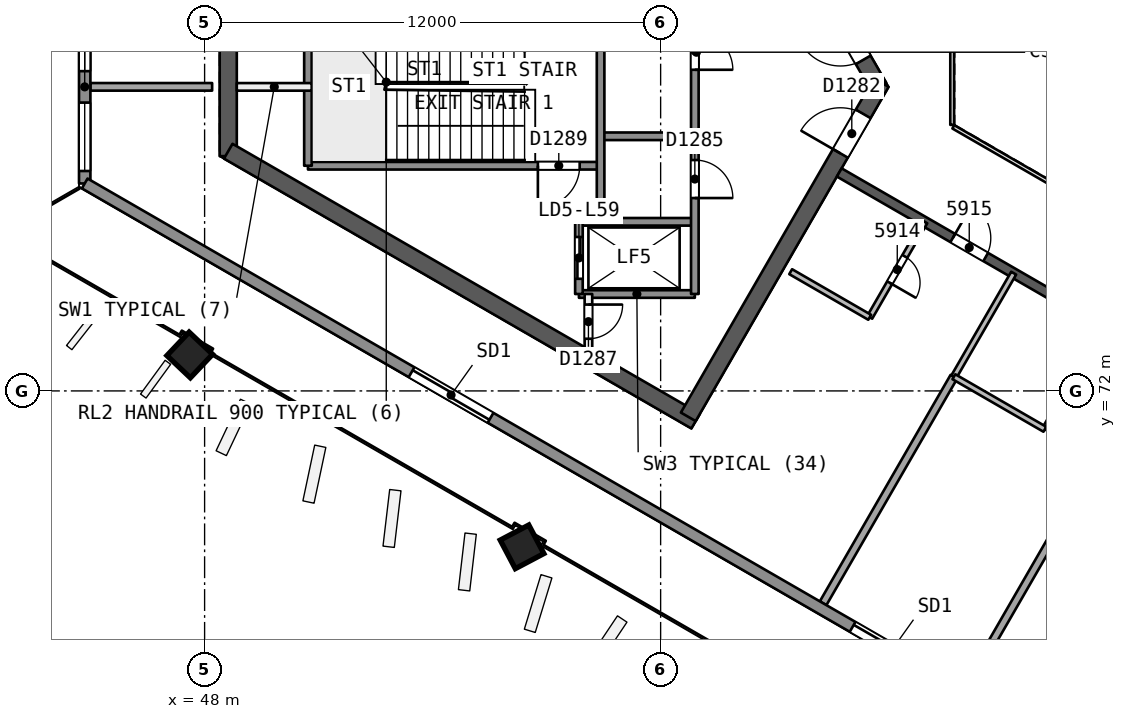
"""IFC4 building model, lengths in metres.
Left out: names, types, materials, properties, quantities, classifications, styles, units other than length and angle.
Written with IfcOpenShell. Run it as: python <this file> out.ifc"""

import sys

from ifc_helpers import new_model, si_unit, direction, frame, frame_2d, origin, origin_2d, place, context, subcontext, project, spatial, rectangle, extrude, element, fill, save


model = new_model("IFC4")
c1 = context("Model", 3, precision=1e-05, world=origin(), true_north=direction((0.0, 1.0)))
c2 = subcontext(c1, "Body", "Model", "MODEL_VIEW")
j1 = project(units=[si_unit("LENGTHUNIT", "METRE"), si_unit("PLANEANGLEUNIT", "RADIAN")], contexts=[c1])
p1 = place(None, origin())
s1 = spatial("IfcSite", under=j1, at=p1, CompositionType="ELEMENT")
p2 = place(p1, origin())
s2 = spatial("IfcBuilding", under=s1, at=p2, CompositionType="ELEMENT")
p3 = place(p2, frame((0.0, 0.0, 239.1)))
s3 = spatial("IfcBuildingStorey", under=s2, at=p3, CompositionType="ELEMENT", Elevation=239.1)
p4 = place(p3, frame((65.74, 80.0, 0.0), z_axis=(0.0, 0.0, 1.0), x_axis=(-0.499991857942, 0.866030104553, 0.0)))
e1 = element("IfcWall", 1, at=p4, inside=s3, PredefinedType="SHEAR", context=c2, shape_type="SweptSolid", body=[
    extrude(rectangle(XDim=10.25, YDim=0.45, at=frame_2d((5.125, 0.0))), origin(), (0.0, 0.0, 1.0), 3.7),
])
p5 = place(p4, frame((0.82, 0.0, 0.0)))
e2 = element("IfcOpeningElement", 2, at=p5, cuts=e1, PredefinedType="OPENING", context=c2, shape_type="SweptSolid", body=[
    extrude(rectangle(XDim=1.2, YDim=2.1, at=frame_2d((0.6, 1.05))), frame((0.0, 0.235, 0.0), z_axis=(0.0, -1.0, 0.0), x_axis=(1.0, 0.0, 0.0)), (0.0, 0.0, 1.0), 0.471),
])
p6 = place(p3, frame((48.622, 81.693, 0.0), z_axis=(0.0, 0.0, 1.0), x_axis=(0.0, -1.0, 0.0)))
e3 = element("IfcWall", 3, at=p6, inside=s3, PredefinedType="SHEAR", context=c2, shape_type="SweptSolid", body=[
    extrude(rectangle(XDim=3.515, YDim=0.45, at=frame_2d((1.758, 0.0))), origin(), (0.0, 0.0, 1.0), 3.7),
])
p7 = place(p3, frame((48.622, 78.307, 0.0), z_axis=(0.0, 0.0, 1.0), x_axis=(0.86602701116, -0.499997215934, 0.0)))
e4 = element("IfcWall", 4, at=p7, inside=s3, PredefinedType="SHEAR", context=c2, shape_type="SweptSolid", body=[
    extrude(rectangle(XDim=14.204, YDim=0.45, at=frame_2d((7.102, 0.0))), origin(), (0.0, 0.0, 1.0), 3.7),
])
p8 = place(p3, frame((60.728, 71.318, 0.0), z_axis=(0.0, 0.0, 1.0), x_axis=(0.500012416173, 0.866018235185, 0.0)))
e5 = element("IfcWall", 5, at=p8, inside=s3, PredefinedType="SHEAR", context=c2, shape_type="SweptSolid", body=[
    extrude(rectangle(XDim=10.155, YDim=0.45, at=frame_2d((5.078, 0.0))), origin(), (0.0, 0.0, 1.0), 3.7),
])
p9 = place(p8, frame((8.005, 0.0, 0.0)))
e6 = element("IfcOpeningElement", 6, at=p9, cuts=e5, PredefinedType="OPENING", context=c2, shape_type="SweptSolid", body=[
    extrude(rectangle(XDim=1.2, YDim=2.1, at=frame_2d((0.6, 1.05))), frame((0.0, 0.235, 0.0), z_axis=(0.0, -1.0, 0.0), x_axis=(1.0, 0.0, 0.0)), (0.0, 0.0, 1.0), 0.471),
])
p10 = place(p3, frame((64.7, 77.748, 0.0), z_axis=(0.0, 0.0, 1.0), x_axis=(0.866026492143, -0.499998114903, 0.0)))
e7 = element("IfcWall", 7, at=p10, inside=s3, PredefinedType="SHEAR", context=c2, shape_type="SweptSolid", body=[
    extrude(rectangle(XDim=15.588, YDim=0.25, at=frame_2d((7.794, 0.0))), origin(), (0.0, 0.0, 1.0), 3.3),
])
p11 = place(p10, frame((3.45, 0.0, 0.0)))
e8 = element("IfcOpeningElement", 8, at=p11, cuts=e7, PredefinedType="OPENING", context=c2, shape_type="SweptSolid", body=[
    extrude(rectangle(XDim=1.0, YDim=2.1, at=frame_2d((0.5, 1.05))), frame((0.0, 0.135, 0.0), z_axis=(0.0, -1.0, 0.0), x_axis=(1.0, 0.0, 0.0)), (0.0, 0.0, 1.0), 0.271),
])
p12 = place(p10, frame((8.315, 0.0, 0.0)))
e9 = element("IfcOpeningElement", 9, at=p12, cuts=e7, PredefinedType="OPENING", context=c2, shape_type="SweptSolid", body=[
    extrude(rectangle(XDim=1.1, YDim=2.1, at=frame_2d((0.55, 1.05))), frame((0.0, 0.135, 0.0), z_axis=(0.0, -1.0, 0.0), x_axis=(1.0, 0.0, 0.0)), (0.0, 0.0, 1.0), 0.271),
])
p13 = place(p10, frame((10.827, 0.0, 0.0)))
e10 = element("IfcOpeningElement", 10, at=p13, cuts=e7, PredefinedType="OPENING", context=c2, shape_type="SweptSolid", body=[
    extrude(rectangle(XDim=1.0, YDim=2.1, at=frame_2d((0.5, 1.05))), frame((0.0, 0.135, 0.0), z_axis=(0.0, -1.0, 0.0), x_axis=(1.0, 0.0, 0.0)), (0.0, 0.0, 1.0), 0.271),
])
p14 = place(p3, frame((47.575, 72.938, 0.0), z_axis=(0.028559101991, 0.006859460986, 0.999568569678), x_axis=(-0.866411455062, 0.498874907895, 0.021331123037)))
e11 = element("IfcColumn", 11, at=p14, inside=s3, PredefinedType="COLUMN", context=c2, shape_type="SweptSolid", body=[
    extrude(rectangle(XDim=0.85, YDim=0.85, at=origin_2d()), origin(), (0.0, 0.0, 1.0), 3.702),
])
p15 = place(p3, frame((56.33, 67.883, 0.0), z_axis=(0.019328516974, 0.012138044789, 0.999739504221), x_axis=(-0.865694061334, 0.500459928951, 0.010660754407)))
e12 = element("IfcColumn", 12, at=p15, inside=s3, PredefinedType="COLUMN", context=c2, shape_type="SweptSolid", body=[
    extrude(rectangle(XDim=0.85, YDim=0.85, at=origin_2d()), origin(), (0.0, 0.0, 1.0), 3.701),
])
p16 = place(p3, frame((44.994, 80.001, 0.0), z_axis=(0.0, 0.0, 1.0), x_axis=(1.0, 0.0, 0.0)))
e13 = element("IfcWall", 13, at=p16, inside=s3, PredefinedType="PARTITIONING", context=c2, shape_type="SweptSolid", body=[
    extrude(rectangle(XDim=3.204, YDim=0.2, at=frame_2d((1.602, 0.0))), origin(), (0.0, 0.0, 1.0), 3.3),
])
p17 = place(p3, frame((66.952, 76.448, 0.0), z_axis=(0.0, 0.0, 1.0), x_axis=(-0.499987231761, -0.866032775405, 0.0)))
e14 = element("IfcWall", 14, at=p17, inside=s3, PredefinedType="PARTITIONING", context=c2, shape_type="SweptSolid", body=[
    extrude(rectangle(XDim=2.9, YDim=0.15, at=frame_2d((1.45, 0.0))), origin(), (0.0, 0.0, 1.0), 3.3),
])
p18 = place(p17, frame((1.05, 0.0, 0.0)))
e15 = element("IfcOpeningElement", 15, at=p18, cuts=e14, PredefinedType="OPENING", context=c2, shape_type="SweptSolid", body=[
    extrude(rectangle(XDim=0.8, YDim=2.1, at=frame_2d((0.4, 1.05))), frame((0.0, 0.085, 0.0), z_axis=(0.0, -1.0, 0.0), x_axis=(1.0, 0.0, 0.0)), (0.0, 0.0, 1.0), 0.171),
])
p19 = place(p3, frame((65.502, 73.937, 0.0), z_axis=(0.0, 0.0, 1.0), x_axis=(-0.865994240961, 0.500053971709, 0.0)))
e16 = element("IfcWall", 16, at=p19, inside=s3, PredefinedType="PARTITIONING", context=c2, shape_type="SweptSolid", body=[
    extrude(rectangle(XDim=2.401, YDim=0.15, at=frame_2d((1.201, 0.0))), origin(), (0.0, 0.0, 1.0), 3.3),
])
p20 = place(p3, frame((64.275, 66.413, 0.0), z_axis=(0.0, 0.0, 1.0), x_axis=(0.500015178307, 0.866016640408, 0.0)))
e17 = element("IfcWall", 17, at=p20, inside=s3, PredefinedType="PARTITIONING", context=c2, shape_type="SweptSolid", body=[
    extrude(rectangle(XDim=6.883, YDim=0.2, at=frame_2d((3.441, 0.0))), origin(), (0.0, 0.0, 1.0), 3.3),
])
p21 = place(p3, frame((67.717, 72.373, 0.0), z_axis=(0.0, 0.0, 1.0), x_axis=(0.500002266011, 0.866024095498, 0.0)))
e18 = element("IfcWall", 18, at=p21, inside=s3, PredefinedType="PARTITIONING", context=c2, shape_type="SweptSolid", body=[
    extrude(rectangle(XDim=3.147, YDim=0.15, at=frame_2d((1.573, 0.0))), origin(), (0.0, 0.0, 1.0), 3.3),
])
p22 = place(p3, frame((71.684, 73.716, 0.0), z_axis=(0.0, 0.0, 1.0), x_axis=(-0.499977671647, -0.866038294681, 0.0)))
e19 = element("IfcWall", 19, at=p22, inside=s3, PredefinedType="PARTITIONING", context=c2, shape_type="SweptSolid", body=[
    extrude(rectangle(XDim=3.147, YDim=0.15, at=frame_2d((1.573, 0.0))), origin(), (0.0, 0.0, 1.0), 3.3),
])
p23 = place(p22, frame((1.123, 0.0, 0.0)))
e20 = element("IfcOpeningElement", 20, at=p23, cuts=e19, PredefinedType="OPENING", context=c2, shape_type="SweptSolid", body=[
    extrude(rectangle(XDim=0.9, YDim=2.1, at=frame_2d((0.45, 1.05))), frame((0.0, 0.085, 0.0), z_axis=(0.0, -1.0, 0.0), x_axis=(1.0, 0.0, 0.0)), (0.0, 0.0, 1.0), 0.171),
])
p24 = place(p3, frame((70.111, 70.991, 0.0), z_axis=(0.0, 0.0, 1.0), x_axis=(-0.866050310653, 0.499956857557, 0.0)))
e21 = element("IfcWall", 21, at=p24, inside=s3, PredefinedType="PARTITIONING", context=c2, shape_type="SweptSolid", body=[
    extrude(rectangle(XDim=2.765, YDim=0.15, at=frame_2d((1.382, 0.0))), origin(), (0.0, 0.0, 1.0), 3.3),
])
p25 = place(p3, frame((68.055, 64.23, 0.0), z_axis=(0.0, 0.0, 1.0), x_axis=(0.50001112685, 0.866018979599, 0.0)))
e22 = element("IfcWall", 22, at=p25, inside=s3, PredefinedType="PARTITIONING", context=c2, shape_type="SweptSolid", body=[
    extrude(rectangle(XDim=10.03, YDim=0.2, at=frame_2d((5.015, 0.0))), origin(), (0.0, 0.0, 1.0), 3.3),
])
p26 = place(p3, frame((44.845, 77.458, 0.0), z_axis=(0.0, 0.0, 1.0), x_axis=(0.0, 1.0, 0.0)))
e23 = element("IfcWall", 23, at=p26, inside=s3, PredefinedType="SOLIDWALL", context=c2, shape_type="SweptSolid", body=[
    extrude(rectangle(XDim=5.083, YDim=0.3, at=frame_2d((2.542, 0.0))), origin(), (0.0, 0.0, 1.0), 3.3),
])
p27 = place(p26, frame((2.955, 0.0, 0.9)))
e24 = element("IfcOpeningElement", 24, at=p27, cuts=e23, PredefinedType="OPENING", context=c2, shape_type="SweptSolid", body=[
    extrude(rectangle(XDim=1.8, YDim=1.5, at=frame_2d((0.9, 0.75))), frame((0.0, 0.161, 0.0), z_axis=(0.0, -1.0, 0.0), x_axis=(1.0, 0.0, 0.0)), (0.0, 0.0, 1.0), 0.321),
])
p28 = place(p26, frame((0.328, 0.0, 0.9)))
e25 = element("IfcOpeningElement", 25, at=p28, cuts=e23, PredefinedType="OPENING", context=c2, shape_type="SweptSolid", body=[
    extrude(rectangle(XDim=1.8, YDim=1.5, at=frame_2d((0.9, 0.75))), frame((0.0, 0.161, 0.0), z_axis=(0.0, -1.0, 0.0), x_axis=(1.0, 0.0, 0.0)), (0.0, 0.0, 1.0), 0.321),
])
p29 = place(p3, frame((87.876, 52.614, 0.0), z_axis=(0.0, 0.0, 1.0), x_axis=(-0.866025459945, 0.499999902727, 0.0)))
e26 = element("IfcWall", 26, at=p29, inside=s3, PredefinedType="SOLIDWALL", context=c2, shape_type="SweptSolid", body=[
    extrude(rectangle(XDim=49.688, YDim=0.3, at=frame_2d((24.844, 0.0))), origin(), (0.0, 0.0, 1.0), 3.3),
])
p30 = place(p29, frame((23.956, 0.0, 0.0)))
e27 = element("IfcOpeningElement", 27, at=p30, cuts=e26, PredefinedType="OPENING", context=c2, shape_type="SweptSolid", body=[
    extrude(rectangle(XDim=2.4, YDim=2.4, at=frame_2d((1.2, 1.2))), frame((0.0, 0.161, 0.0), z_axis=(0.0, -1.0, 0.0), x_axis=(1.0, 0.0, 0.0)), (0.0, 0.0, 1.0), 0.321),
])
p31 = place(p29, frame((37.357, 0.0, 0.0)))
e28 = element("IfcOpeningElement", 28, at=p31, cuts=e26, PredefinedType="OPENING", context=c2, shape_type="SweptSolid", body=[
    extrude(rectangle(XDim=2.4, YDim=2.4, at=frame_2d((1.2, 1.2))), frame((0.0, 0.161, 0.0), z_axis=(0.0, -1.0, 0.0), x_axis=(1.0, 0.0, 0.0)), (0.0, 0.0, 1.0), 0.321),
])
p32 = place(p29, frame((10.243, 0.0, 0.0)))
e29 = element("IfcOpeningElement", 29, at=p32, cuts=e26, PredefinedType="OPENING", context=c2, shape_type="SweptSolid", body=[
    extrude(rectangle(XDim=2.4, YDim=2.4, at=frame_2d((1.2, 1.2))), frame((0.0, 0.161, 0.0), z_axis=(0.0, -1.0, 0.0), x_axis=(1.0, 0.0, 0.0)), (0.0, 0.0, 1.0), 0.321),
])
p33 = place(p3, frame((50.82, 80.0, 0.0), z_axis=(0.0, 0.0, 1.0), x_axis=(-1.0, 0.0, 0.0)))
e30 = element("IfcWall", 30, at=p33, inside=s3, PredefinedType="PARTITIONING", context=c2, shape_type="SweptSolid", body=[
    extrude(rectangle(XDim=1.973, YDim=0.2, at=frame_2d((0.987, 0.0))), origin(), (0.0, 0.0, 1.0), 3.3),
])
p34 = place(p3, frame((60.9, 78.7, 0.0), z_axis=(0.0, 0.0, 1.0), x_axis=(-1.0, 0.0, 0.0)))
e31 = element("IfcWall", 31, at=p34, inside=s3, PredefinedType="SOLIDWALL", context=c2, shape_type="SweptSolid", body=[
    extrude(rectangle(XDim=2.48, YDim=0.2, at=frame_2d((1.24, 0.0))), origin(), (0.0, 0.0, 1.0), 3.3),
])
p35 = place(p3, frame((58.42, 77.925, 0.0), z_axis=(0.0, 0.0, 1.0), x_axis=(-1.0, 0.0, 0.0)))
e32 = element("IfcWall", 32, at=p35, inside=s3, PredefinedType="SOLIDWALL", context=c2, shape_type="SweptSolid", body=[
    extrude(rectangle(XDim=7.7, YDim=0.2, at=frame_2d((3.85, 0.0))), origin(), (0.0, 0.0, 1.0), 3.3),
])
p36 = place(p35, frame((0.55, 0.0, 0.0)))
e33 = element("IfcOpeningElement", 33, at=p36, cuts=e32, PredefinedType="OPENING", context=c2, shape_type="SweptSolid", body=[
    extrude(rectangle(XDim=1.1, YDim=2.1, at=frame_2d((0.55, 1.05))), frame((0.0, 0.11, 0.0), z_axis=(0.0, -1.0, 0.0), x_axis=(1.0, 0.0, 0.0)), (0.0, 0.0, 1.0), 0.221),
])
for number, where, z_axis, x_axis in (
    (34, (60.9, 76.45, 0.0), (0.0, 0.0, 1.0), (-1.0, 0.0, 0.0)),
    (35, (60.9, 74.55, 0.0), (0.0, 0.0, 1.0), (-1.0, 0.0, 0.0)),
):
    element("IfcWall", number, at=place(p3, frame(where, z_axis=z_axis, x_axis=x_axis)), inside=s3, PredefinedType="SOLIDWALL", context=c2, shape_type="SweptSolid", body=[
        extrude(rectangle(XDim=3.05, YDim=0.2, at=frame_2d((1.525, 0.0))), origin(), (0.0, 0.0, 1.0), 3.3),
    ])
p37 = place(p3, frame((60.9, 85.45, 0.0), z_axis=(0.0, 0.0, 1.0), x_axis=(0.0, -1.0, 0.0)))
e36 = element("IfcWall", 36, at=p37, inside=s3, PredefinedType="SOLIDWALL", context=c2, shape_type="SweptSolid", body=[
    extrude(rectangle(XDim=10.9, YDim=0.2, at=frame_2d((5.45, 0.0))), origin(), (0.0, 0.0, 1.0), 3.3),
])
p38 = place(p37, frame((0.625, 0.0, 0.0)))
e37 = element("IfcOpeningElement", 37, at=p38, cuts=e36, PredefinedType="OPENING", context=c2, shape_type="SweptSolid", body=[
    extrude(rectangle(XDim=1.0, YDim=2.1, at=frame_2d((0.5, 1.05))), frame((0.0, 0.11, 0.0), z_axis=(0.0, -1.0, 0.0), x_axis=(1.0, 0.0, 0.0)), (0.0, 0.0, 1.0), 0.221),
])
p39 = place(p37, frame((4.0, 0.0, 0.0)))
e38 = element("IfcOpeningElement", 38, at=p39, cuts=e36, PredefinedType="OPENING", context=c2, shape_type="SweptSolid", body=[
    extrude(rectangle(XDim=1.0, YDim=2.1, at=frame_2d((0.5, 1.05))), frame((0.0, 0.11, 0.0), z_axis=(0.0, -1.0, 0.0), x_axis=(1.0, 0.0, 0.0)), (0.0, 0.0, 1.0), 0.221),
])
p40 = place(p37, frame((7.375, 0.0, 0.0)))
e39 = element("IfcOpeningElement", 39, at=p40, cuts=e36, PredefinedType="OPENING", context=c2, shape_type="SweptSolid", body=[
    extrude(rectangle(XDim=1.0, YDim=2.1, at=frame_2d((0.5, 1.05))), frame((0.0, 0.11, 0.0), z_axis=(0.0, -1.0, 0.0), x_axis=(1.0, 0.0, 0.0)), (0.0, 0.0, 1.0), 0.221),
])
p41 = place(p3, frame((58.42, 87.09, 0.0), z_axis=(0.0, 0.0, 1.0), x_axis=(0.0, -1.0, 0.0)))
e40 = element("IfcWall", 40, at=p41, inside=s3, PredefinedType="SOLIDWALL", context=c2, shape_type="SweptSolid", body=[
    extrude(rectangle(XDim=10.64, YDim=0.2, at=frame_2d((5.32, 0.0))), origin(), (0.0, 0.0, 1.0), 3.3),
])
p42 = place(p41, frame((0.37, 0.0, 0.0)))
e41 = element("IfcOpeningElement", 41, at=p42, cuts=e40, PredefinedType="OPENING", context=c2, shape_type="SweptSolid", body=[
    extrude(rectangle(XDim=0.9, YDim=2.1, at=frame_2d((0.45, 1.05))), frame((0.0, 0.11, 0.0), z_axis=(0.0, -1.0, 0.0), x_axis=(1.0, 0.0, 0.0)), (0.0, 0.0, 1.0), 0.221),
])
p43 = place(p3, frame((58.1, 74.55, 0.0), z_axis=(0.0, 0.0, 1.0), x_axis=(0.0, -1.0, 0.0)))
e42 = element("IfcWall", 42, at=p43, inside=s3, PredefinedType="PARTITIONING", context=c2, shape_type="SweptSolid", body=[
    extrude(rectangle(XDim=1.455, YDim=0.2, at=frame_2d((0.728, 0.0))), origin(), (0.0, 0.0, 1.0), 3.3),
])
p44 = place(p43, frame((0.278, 0.0, 0.0)))
e43 = element("IfcOpeningElement", 43, at=p44, cuts=e42, PredefinedType="OPENING", context=c2, shape_type="SweptSolid", body=[
    extrude(rectangle(XDim=0.9, YDim=2.1, at=frame_2d((0.45, 1.05))), frame((0.0, 0.11, 0.0), z_axis=(0.0, -1.0, 0.0), x_axis=(1.0, 0.0, 0.0)), (0.0, 0.0, 1.0), 0.221),
])
p45 = place(p3, frame((57.85, 76.45, 0.0), z_axis=(0.0, 0.0, 1.0), x_axis=(0.0, -1.0, 0.0)))
e44 = element("IfcWall", 44, at=p45, inside=s3, PredefinedType="SOLIDWALL", context=c2, shape_type="SweptSolid", body=[
    extrude(rectangle(XDim=1.9, YDim=0.2, at=frame_2d((0.95, 0.0))), origin(), (0.0, 0.0, 1.0), 3.3),
])
p46 = place(p45, frame((0.4, 0.0, 0.0)))
e45 = element("IfcOpeningElement", 45, at=p46, cuts=e44, PredefinedType="OPENING", context=c2, shape_type="SweptSolid", body=[
    extrude(rectangle(XDim=1.1, YDim=2.1, at=frame_2d((0.55, 1.05))), frame((0.0, 0.11, 0.0), z_axis=(0.0, -1.0, 0.0), x_axis=(1.0, 0.0, 0.0)), (0.0, 0.0, 1.0), 0.221),
])
p47 = place(p3, frame((50.72, 82.075, 0.0), z_axis=(0.0, 0.0, 1.0), x_axis=(0.0, -1.0, 0.0)))
e46 = element("IfcWall", 46, at=p47, inside=s3, PredefinedType="SOLIDWALL", context=c2, shape_type="SweptSolid", body=[
    extrude(rectangle(XDim=4.15, YDim=0.2, at=frame_2d((2.075, 0.0))), origin(), (0.0, 0.0, 1.0), 3.3),
])
p48 = place(p3, frame((67.672, 81.0, 0.0), z_axis=(0.0, 0.0, 1.0), x_axis=(0.0, -1.0, 0.0)))
e47 = element("IfcWall", 47, at=p48, inside=s3, PredefinedType="PARTITIONING", context=c2, shape_type="SweptSolid", body=[
    extrude(rectangle(XDim=2.0, YDim=0.1, at=frame_2d((1.0, 0.0))), origin(), (0.0, 0.0, 1.0), 3.3),
])
p49 = place(p3, frame((67.702, 78.948, 0.0), z_axis=(0.0, 0.0, 1.0), x_axis=(0.866026658274, -0.499997827154, 0.0)))
e48 = element("IfcWall", 48, at=p49, inside=s3, PredefinedType="PARTITIONING", context=c2, shape_type="SweptSolid", body=[
    extrude(rectangle(XDim=11.588, YDim=0.1, at=frame_2d((5.794, 0.0))), origin(), (0.0, 0.0, 1.0), 3.3),
])
p50 = place(p18, origin())
e49 = element("IfcDoor", 49, at=p50, inside=s3, OperationType="SINGLE_SWING_RIGHT", PredefinedType="NOTDEFINED", context=c2, shape_type="SweptSolid", body=[
    extrude(rectangle(XDim=0.8, YDim=2.1, at=frame_2d((0.4, 1.05))), frame((0.0, 0.025, 0.0), z_axis=(0.0, -1.0, 0.0), x_axis=(1.0, 0.0, 0.0)), (0.0, 0.0, 1.0), 0.05),
])
fill(e15, e49)
p51 = place(p11, origin())
e50 = element("IfcDoor", 50, at=p51, inside=s3, OperationType="SINGLE_SWING_LEFT", PredefinedType="NOTDEFINED", context=c2, shape_type="SweptSolid", body=[
    extrude(rectangle(XDim=1.0, YDim=2.1, at=frame_2d((0.5, 1.05))), frame((0.0, 0.025, 0.0), z_axis=(0.0, -1.0, 0.0), x_axis=(1.0, 0.0, 0.0)), (0.0, 0.0, 1.0), 0.05),
])
fill(e8, e50)
p52 = place(p27, origin())
e51 = element("IfcWindow", 51, at=p52, inside=s3, PartitioningType="SINGLE_PANEL", PredefinedType="WINDOW", context=c2, shape_type="SweptSolid", body=[
    extrude(rectangle(XDim=1.8, YDim=1.5, at=frame_2d((0.9, 0.75))), frame((0.0, 0.03, 0.0), z_axis=(0.0, -1.0, 0.0), x_axis=(1.0, 0.0, 0.0)), (0.0, 0.0, 1.0), 0.06),
])
fill(e24, e51)
p53 = place(p28, origin())
e52 = element("IfcWindow", 52, at=p53, inside=s3, PartitioningType="SINGLE_PANEL", PredefinedType="WINDOW", context=c2, shape_type="SweptSolid", body=[
    extrude(rectangle(XDim=1.8, YDim=1.5, at=frame_2d((0.9, 0.75))), frame((0.0, 0.03, 0.0), z_axis=(0.0, -1.0, 0.0), x_axis=(1.0, 0.0, 0.0)), (0.0, 0.0, 1.0), 0.06),
])
fill(e25, e52)
p54 = place(p30, origin())
e53 = element("IfcDoor", 53, at=p54, inside=s3, OperationType="SLIDING_TO_LEFT", PredefinedType="NOTDEFINED", context=c2, shape_type="SweptSolid", body=[
    extrude(rectangle(XDim=2.4, YDim=2.4, at=frame_2d((1.2, 1.2))), frame((0.0, 0.025, 0.0), z_axis=(0.0, -1.0, 0.0), x_axis=(1.0, 0.0, 0.0)), (0.0, 0.0, 1.0), 0.05),
])
fill(e27, e53)
p55 = place(p31, origin())
e54 = element("IfcDoor", 54, at=p55, inside=s3, OperationType="SLIDING_TO_RIGHT", PredefinedType="NOTDEFINED", context=c2, shape_type="SweptSolid", body=[
    extrude(rectangle(XDim=2.4, YDim=2.4, at=frame_2d((1.2, 1.2))), frame((0.0, 0.025, 0.0), z_axis=(0.0, -1.0, 0.0), x_axis=(1.0, 0.0, 0.0)), (0.0, 0.0, 1.0), 0.05),
])
fill(e28, e54)
p56 = place(p5, origin())
e55 = element("IfcDoor", 55, at=p56, inside=s3, OperationType="SINGLE_SWING_RIGHT", PredefinedType="NOTDEFINED", context=c2, shape_type="SweptSolid", body=[
    extrude(rectangle(XDim=1.2, YDim=2.1, at=frame_2d((0.6, 1.05))), frame((0.0, 0.025, 0.0), z_axis=(0.0, -1.0, 0.0), x_axis=(1.0, 0.0, 0.0)), (0.0, 0.0, 1.0), 0.05),
])
fill(e2, e55)
p57 = place(p9, origin())
e56 = element("IfcDoor", 56, at=p57, inside=s3, OperationType="SINGLE_SWING_LEFT", PredefinedType="NOTDEFINED", context=c2, shape_type="SweptSolid", body=[
    extrude(rectangle(XDim=1.2, YDim=2.1, at=frame_2d((0.6, 1.05))), frame((0.0, 0.025, 0.0), z_axis=(0.0, -1.0, 0.0), x_axis=(1.0, 0.0, 0.0)), (0.0, 0.0, 1.0), 0.05),
])
fill(e6, e56)
p58 = place(p46, origin())
e57 = element("IfcDoor", 57, at=p58, inside=s3, OperationType="SLIDING_TO_RIGHT", PredefinedType="NOTDEFINED", context=c2, shape_type="SweptSolid", body=[
    extrude(rectangle(XDim=1.1, YDim=2.1, at=frame_2d((0.55, 1.05))), frame((0.0, 0.025, 0.0), z_axis=(0.0, -1.0, 0.0), x_axis=(1.0, 0.0, 0.0)), (0.0, 0.0, 1.0), 0.05),
])
fill(e45, e57)
p59 = place(p39, origin())
e58 = element("IfcDoor", 58, at=p59, inside=s3, OperationType="SINGLE_SWING_RIGHT", PredefinedType="NOTDEFINED", context=c2, shape_type="SweptSolid", body=[
    extrude(rectangle(XDim=1.0, YDim=2.1, at=frame_2d((0.5, 1.05))), frame((0.0, 0.025, 0.0), z_axis=(0.0, -1.0, 0.0), x_axis=(1.0, 0.0, 0.0)), (0.0, 0.0, 1.0), 0.05),
])
fill(e38, e58)
p60 = place(p40, origin())
e59 = element("IfcDoor", 59, at=p60, inside=s3, OperationType="SINGLE_SWING_RIGHT", PredefinedType="NOTDEFINED", context=c2, shape_type="SweptSolid", body=[
    extrude(rectangle(XDim=1.0, YDim=2.1, at=frame_2d((0.5, 1.05))), frame((0.0, 0.025, 0.0), z_axis=(0.0, -1.0, 0.0), x_axis=(1.0, 0.0, 0.0)), (0.0, 0.0, 1.0), 0.05),
])
fill(e39, e59)
p61 = place(p44, origin())
e60 = element("IfcDoor", 60, at=p61, inside=s3, OperationType="SINGLE_SWING_LEFT", PredefinedType="NOTDEFINED", context=c2, shape_type="SweptSolid", body=[
    extrude(rectangle(XDim=0.9, YDim=2.1, at=frame_2d((0.45, 1.05))), frame((0.0, 0.025, 0.0), z_axis=(0.0, -1.0, 0.0), x_axis=(1.0, 0.0, 0.0)), (0.0, 0.0, 1.0), 0.05),
])
fill(e43, e60)
p62 = place(p36, origin())
e61 = element("IfcDoor", 61, at=p62, inside=s3, OperationType="SINGLE_SWING_RIGHT", PredefinedType="NOTDEFINED", context=c2, shape_type="SweptSolid", body=[
    extrude(rectangle(XDim=1.1, YDim=2.1, at=frame_2d((0.55, 1.05))), frame((0.0, 0.025, 0.0), z_axis=(0.0, -1.0, 0.0), x_axis=(1.0, 0.0, 0.0)), (0.0, 0.0, 1.0), 0.05),
])
fill(e33, e61)
save(model, sys.argv[1])
